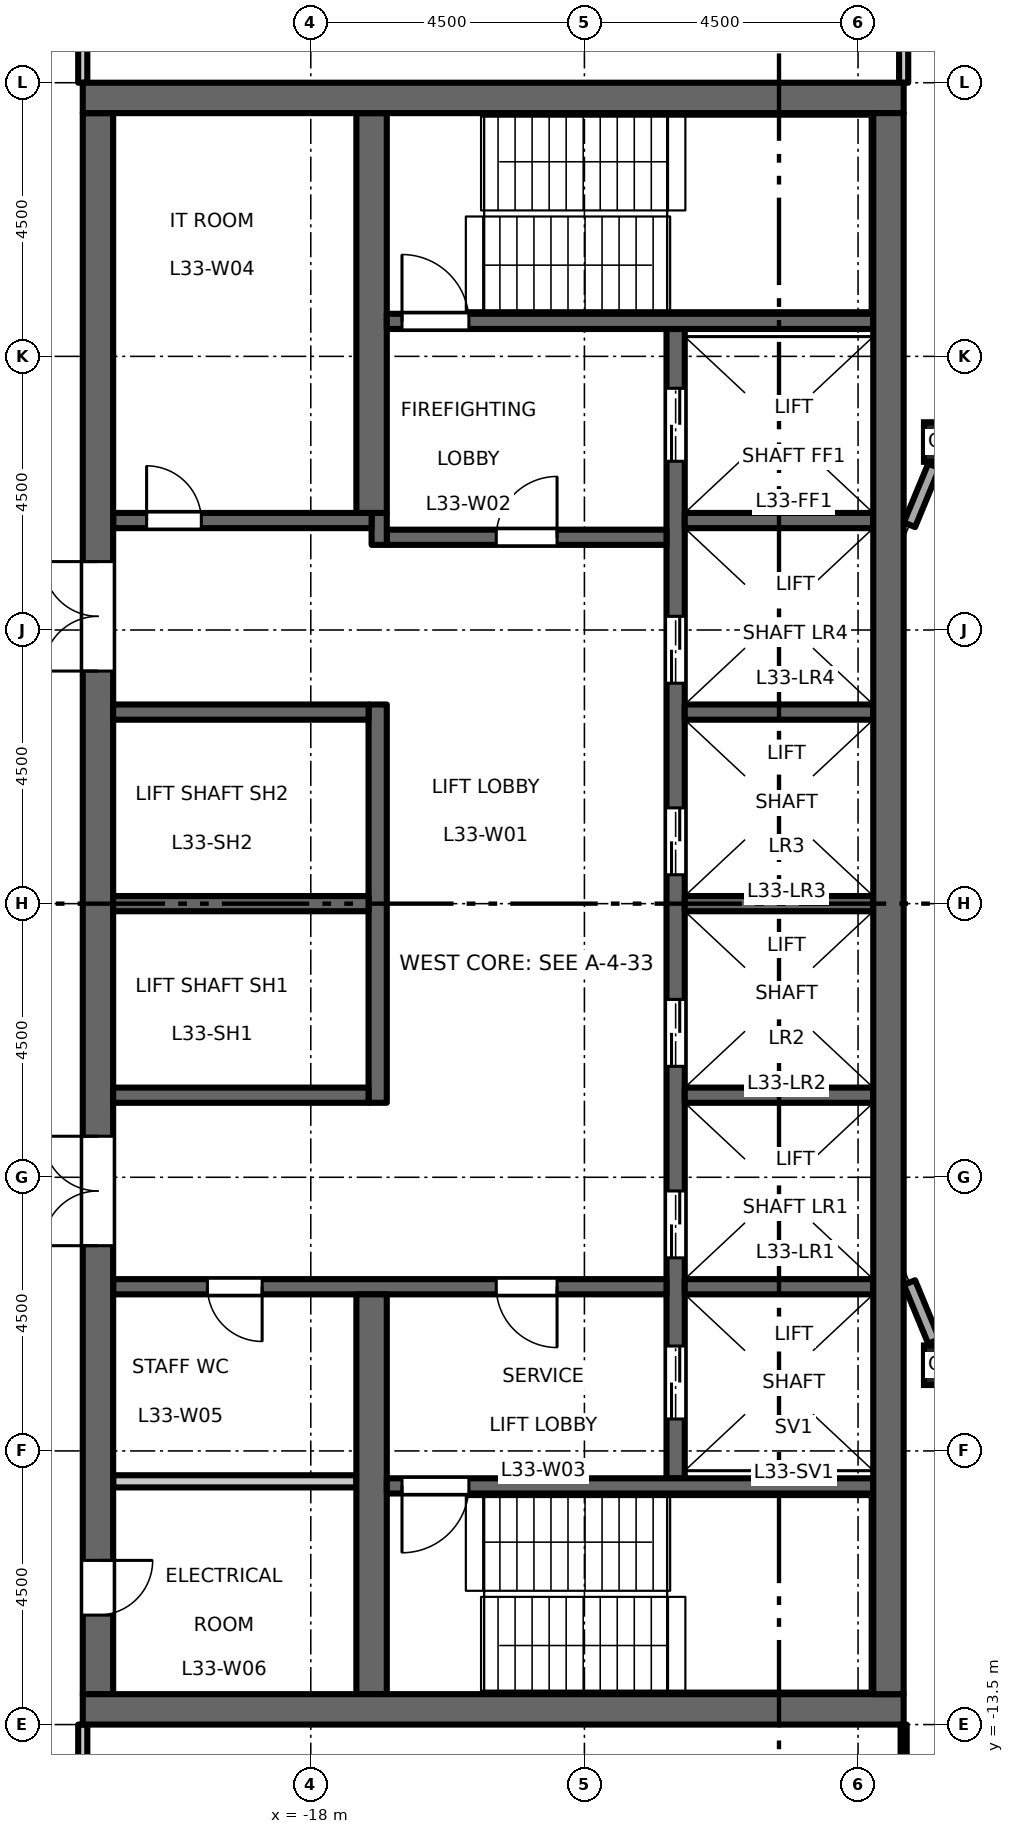
"""IFC4 building model, lengths in metres.
Left out: names, types, materials, properties, quantities, classifications, styles, units other than length and angle.
Written with IfcOpenShell. Run it as: python <this file> out.ifc"""

import sys

from ifc_helpers import new_model, si_unit, direction, frame, frame_2d, origin, origin_2d, place, context, subcontext, project, spatial, rectangle, hollow_rectangle, extrude, element, fill, save


model = new_model("IFC4")
c1 = context("Model", 3, precision=1e-05, world=origin(), true_north=direction((0.0, 1.0)))
c2 = subcontext(c1, "Body", "Model", "MODEL_VIEW")
j1 = project(units=[si_unit("LENGTHUNIT", "METRE"), si_unit("PLANEANGLEUNIT", "RADIAN")], contexts=[c1])
p1 = place(None, origin())
s1 = spatial("IfcSite", under=j1, at=p1, CompositionType="ELEMENT")
p2 = place(p1, origin())
s2 = spatial("IfcBuilding", under=s1, at=p2, CompositionType="ELEMENT")
p3 = place(p2, frame((0.0, 0.0, 154.2)))
s3 = spatial("IfcBuildingStorey", under=s2, at=p3, CompositionType="ELEMENT", Elevation=154.2)
for number, where, z_axis, x_axis in (
    (1, (-7.591, -7.591, 0.0), (0.0, 0.0, 1.0), (1.0, 0.0, 0.0)),
    (2, (-7.591, 7.591, 0.0), (0.0, 0.0, 1.0), (1.0, 0.0, 0.0)),
):
    element("IfcColumn", number, at=place(p3, frame(where, z_axis=z_axis, x_axis=x_axis)), inside=s3, PredefinedType="COLUMN", context=c2, shape_type="SweptSolid", body=[
        extrude(hollow_rectangle(XDim=0.65, YDim=0.65, WallThickness=0.036, at=origin_2d()), origin(), (0.0, 0.0, 1.0), 4.5),
    ])
p4 = place(p3, frame((-12.0, -9.45, 0.0), z_axis=(0.0, 0.0, 1.0), x_axis=(0.0, 1.0, 0.0)))
e3 = element("IfcWall", 3, at=p4, inside=s3, PredefinedType="SHEAR", context=c2, shape_type="SweptSolid", body=[
    extrude(rectangle(XDim=18.9, YDim=0.3, at=frame_2d((9.45, 0.0))), origin(), (0.0, 0.0, 1.0), 4.35),
])
p5 = place(p4, frame((3.625, 0.0, 0.0)))
e4 = element("IfcOpeningElement", 4, at=p5, cuts=e3, PredefinedType="OPENING", context=c2, shape_type="SweptSolid", body=[
    extrude(rectangle(XDim=1.1, YDim=2.1, at=frame_2d((0.55, 1.05))), frame((0.0, 0.16, 0.0), z_axis=(0.0, -1.0, 0.0), x_axis=(1.0, 0.0, 0.0)), (0.0, 0.0, 1.0), 0.32),
])
p6 = place(p4, frame((6.775, 0.0, 0.0)))
e5 = element("IfcOpeningElement", 5, at=p6, cuts=e3, PredefinedType="OPENING", context=c2, shape_type="SweptSolid", body=[
    extrude(rectangle(XDim=1.1, YDim=2.1, at=frame_2d((0.55, 1.05))), frame((0.0, 0.16, 0.0), z_axis=(0.0, -1.0, 0.0), x_axis=(1.0, 0.0, 0.0)), (0.0, 0.0, 1.0), 0.32),
])
p7 = place(p4, frame((9.925, 0.0, 0.0)))
e6 = element("IfcOpeningElement", 6, at=p7, cuts=e3, PredefinedType="OPENING", context=c2, shape_type="SweptSolid", body=[
    extrude(rectangle(XDim=1.1, YDim=2.1, at=frame_2d((0.55, 1.05))), frame((0.0, 0.16, 0.0), z_axis=(0.0, -1.0, 0.0), x_axis=(1.0, 0.0, 0.0)), (0.0, 0.0, 1.0), 0.32),
])
p8 = place(p4, frame((13.075, 0.0, 0.0)))
e7 = element("IfcOpeningElement", 7, at=p8, cuts=e3, PredefinedType="OPENING", context=c2, shape_type="SweptSolid", body=[
    extrude(rectangle(XDim=1.1, YDim=2.1, at=frame_2d((0.55, 1.05))), frame((0.0, 0.16, 0.0), z_axis=(0.0, -1.0, 0.0), x_axis=(1.0, 0.0, 0.0)), (0.0, 0.0, 1.0), 0.32),
])
p9 = place(p4, frame((16.725, 0.0, 0.0)))
e8 = element("IfcOpeningElement", 8, at=p9, cuts=e3, PredefinedType="OPENING", context=c2, shape_type="SweptSolid", body=[
    extrude(rectangle(XDim=1.2, YDim=2.1, at=frame_2d((0.6, 1.05))), frame((0.0, 0.16, 0.0), z_axis=(0.0, -1.0, 0.0), x_axis=(1.0, 0.0, 0.0)), (0.0, 0.0, 1.0), 0.32),
])
p10 = place(p4, frame((0.975, 0.0, 0.0)))
e9 = element("IfcOpeningElement", 9, at=p10, cuts=e3, PredefinedType="OPENING", context=c2, shape_type="SweptSolid", body=[
    extrude(rectangle(XDim=1.2, YDim=2.1, at=frame_2d((0.6, 1.05))), frame((0.0, 0.16, 0.0), z_axis=(0.0, -1.0, 0.0), x_axis=(1.0, 0.0, 0.0)), (0.0, 0.0, 1.0), 0.32),
])
p11 = place(p3, frame((-12.15, 6.025, 0.0), z_axis=(0.0, 0.0, 1.0), x_axis=(-1.0, 0.0, 0.0)))
e10 = element("IfcWall", 10, at=p11, inside=s3, PredefinedType="SHEAR", context=c2, shape_type="SweptSolid", body=[
    extrude(rectangle(XDim=4.6, YDim=0.25, at=frame_2d((2.3, 0.0))), origin(), (0.0, 0.0, 1.0), 4.35),
])
p12 = place(p11, frame((1.8, 0.0, 0.0)))
e11 = element("IfcOpeningElement", 11, at=p12, cuts=e10, PredefinedType="OPENING", context=c2, shape_type="SweptSolid", body=[
    extrude(rectangle(XDim=1.0, YDim=2.1, at=frame_2d((0.5, 1.05))), frame((0.0, 0.135, 0.0), z_axis=(0.0, -1.0, 0.0), x_axis=(1.0, 0.0, 0.0)), (0.0, 0.0, 1.0), 0.27),
])
p13 = place(p3, frame((-16.875, 5.9, 0.0), z_axis=(0.0, 0.0, 1.0), x_axis=(0.0, 1.0, 0.0)))
e12 = element("IfcWall", 12, at=p13, inside=s3, PredefinedType="SHEAR", context=c2, shape_type="SweptSolid", body=[
    extrude(rectangle(XDim=0.525, YDim=0.25, at=frame_2d((0.263, 0.0))), origin(), (0.0, 0.0, 1.0), 4.35),
])
p14 = place(p3, frame((-17.0, 6.3, 0.0), z_axis=(0.0, 0.0, 1.0), x_axis=(-1.0, 0.0, 0.0)))
e13 = element("IfcWall", 13, at=p14, inside=s3, PredefinedType="SHEAR", context=c2, shape_type="SweptSolid", body=[
    extrude(rectangle(XDim=4.25, YDim=0.25, at=frame_2d((2.125, 0.0))), origin(), (0.0, 0.0, 1.0), 4.35),
])
p15 = place(p14, frame((2.8, 0.0, 0.0)))
e14 = element("IfcOpeningElement", 14, at=p15, cuts=e13, PredefinedType="OPENING", context=c2, shape_type="SweptSolid", body=[
    extrude(rectangle(XDim=0.9, YDim=2.1, at=frame_2d((0.45, 1.05))), frame((0.0, 0.135, 0.0), z_axis=(0.0, -1.0, 0.0), x_axis=(1.0, 0.0, 0.0)), (0.0, 0.0, 1.0), 0.27),
])
p16 = place(p3, frame((-12.15, -6.3, 0.0), z_axis=(0.0, 0.0, 1.0), x_axis=(-1.0, 0.0, 0.0)))
e15 = element("IfcWall", 15, at=p16, inside=s3, PredefinedType="SHEAR", context=c2, shape_type="SweptSolid", body=[
    extrude(rectangle(XDim=9.1, YDim=0.25, at=frame_2d((4.55, 0.0))), origin(), (0.0, 0.0, 1.0), 4.35),
])
p17 = place(p16, frame((1.8, 0.0, 0.0)))
e16 = element("IfcOpeningElement", 16, at=p17, cuts=e15, PredefinedType="OPENING", context=c2, shape_type="SweptSolid", body=[
    extrude(rectangle(XDim=1.0, YDim=2.1, at=frame_2d((0.5, 1.05))), frame((0.0, 0.135, 0.0), z_axis=(0.0, -1.0, 0.0), x_axis=(1.0, 0.0, 0.0)), (0.0, 0.0, 1.0), 0.27),
])
p18 = place(p16, frame((6.65, 0.0, 0.0)))
e17 = element("IfcOpeningElement", 17, at=p18, cuts=e15, PredefinedType="OPENING", context=c2, shape_type="SweptSolid", body=[
    extrude(rectangle(XDim=0.9, YDim=2.1, at=frame_2d((0.45, 1.05))), frame((0.0, 0.135, 0.0), z_axis=(0.0, -1.0, 0.0), x_axis=(1.0, 0.0, 0.0)), (0.0, 0.0, 1.0), 0.27),
])
p19 = place(p3, frame((-21.5, -13.0, 0.0), z_axis=(0.0, 0.0, 1.0), x_axis=(0.0, 1.0, 0.0)))
e18 = element("IfcWall", 18, at=p19, inside=s3, PredefinedType="SHEAR", context=c2, shape_type="SweptSolid", body=[
    extrude(rectangle(XDim=26.0, YDim=0.5, at=frame_2d((13.0, 0.0))), origin(), (0.0, 0.0, 1.0), 4.35),
])
p20 = place(p19, frame((16.825, 0.0, 0.0)))
e19 = element("IfcOpeningElement", 19, at=p20, cuts=e18, PredefinedType="OPENING", context=c2, shape_type="SweptSolid", body=[
    extrude(rectangle(XDim=1.8, YDim=2.1, at=frame_2d((0.9, 1.05))), frame((0.0, 0.26, 0.0), z_axis=(0.0, -1.0, 0.0), x_axis=(1.0, 0.0, 0.0)), (0.0, 0.0, 1.0), 0.52),
])
p21 = place(p19, frame((7.375, 0.0, 0.0)))
e20 = element("IfcOpeningElement", 20, at=p21, cuts=e18, PredefinedType="OPENING", context=c2, shape_type="SweptSolid", body=[
    extrude(rectangle(XDim=1.8, YDim=2.1, at=frame_2d((0.9, 1.05))), frame((0.0, 0.26, 0.0), z_axis=(0.0, -1.0, 0.0), x_axis=(1.0, 0.0, 0.0)), (0.0, 0.0, 1.0), 0.52),
])
p22 = place(p19, frame((1.3, 0.0, 0.0)))
e21 = element("IfcOpeningElement", 21, at=p22, cuts=e18, PredefinedType="OPENING", context=c2, shape_type="SweptSolid", body=[
    extrude(rectangle(XDim=0.9, YDim=2.1, at=frame_2d((0.45, 1.05))), frame((0.0, 0.26, 0.0), z_axis=(0.0, -1.0, 0.0), x_axis=(1.0, 0.0, 0.0)), (0.0, 0.0, 1.0), 0.52),
])
p23 = place(p3, frame((-17.25, -9.5, 0.0), z_axis=(0.0, 0.0, 1.0), x_axis=(-1.0, 0.0, 0.0)))
e22 = element("IfcWall", 22, at=p23, inside=s3, PredefinedType="PARTITIONING", context=c2, shape_type="SweptSolid", body=[
    extrude(rectangle(XDim=4.0, YDim=0.2, at=frame_2d((2.0, 0.0))), origin(), (0.0, 0.0, 1.0), 4.35),
])
p24 = place(p3, frame((-16.9, -3.275, 0.0), z_axis=(0.0, 0.0, 1.0), x_axis=(0.0, 1.0, 0.0)))
e23 = element("IfcWall", 23, at=p24, inside=s3, PredefinedType="SHEAR", context=c2, shape_type="SweptSolid", body=[
    extrude(rectangle(XDim=6.55, YDim=0.3, at=frame_2d((3.275, 0.0))), origin(), (0.0, 0.0, 1.0), 4.35),
])
for number, where, z_axis, x_axis in (
    (24, (-17.05, 0.0, 0.0), (0.0, 0.0, 1.0), (-1.0, 0.0, 0.0)),
    (25, (-17.05, 3.15, 0.0), (0.0, 0.0, 1.0), (-1.0, 0.0, 0.0)),
    (26, (-17.05, -3.15, 0.0), (0.0, 0.0, 1.0), (-1.0, 0.0, 0.0)),
):
    element("IfcWall", number, at=place(p3, frame(where, z_axis=z_axis, x_axis=x_axis)), inside=s3, PredefinedType="SHEAR", context=c2, shape_type="SweptSolid", body=[
        extrude(rectangle(XDim=4.2, YDim=0.25, at=frame_2d((2.1, 0.0))), origin(), (0.0, 0.0, 1.0), 4.35),
    ])
for number, where, z_axis, x_axis in (
    (27, (-17.0, 6.425, 0.0), (0.0, 0.0, 1.0), (0.0, 1.0, 0.0)),
    (28, (-17.0, -13.0, 0.0), (0.0, 0.0, 1.0), (0.0, 1.0, 0.0)),
):
    element("IfcWall", number, at=place(p3, frame(where, z_axis=z_axis, x_axis=x_axis)), inside=s3, PredefinedType="SHEAR", context=c2, shape_type="SweptSolid", body=[
        extrude(rectangle(XDim=6.575, YDim=0.5, at=frame_2d((3.288, 0.0))), origin(), (0.0, 0.0, 1.0), 4.35),
    ])
for number, where, z_axis, x_axis in (
    (29, (-8.75, 0.0, 0.0), (0.0, 0.0, 1.0), (-1.0, 0.0, 0.0)),
    (30, (-8.75, 3.15, 0.0), (0.0, 0.0, 1.0), (-1.0, 0.0, 0.0)),
    (31, (-8.75, 6.3, 0.0), (0.0, 0.0, 1.0), (-1.0, 0.0, 0.0)),
    (32, (-8.75, -3.15, 0.0), (0.0, 0.0, 1.0), (-1.0, 0.0, 0.0)),
    (33, (-8.75, -6.3, 0.0), (0.0, 0.0, 1.0), (-1.0, 0.0, 0.0)),
):
    element("IfcWall", number, at=place(p3, frame(where, z_axis=z_axis, x_axis=x_axis)), inside=s3, PredefinedType="SHEAR", context=c2, shape_type="SweptSolid", body=[
        extrude(rectangle(XDim=3.1, YDim=0.25, at=frame_2d((1.55, 0.0))), origin(), (0.0, 0.0, 1.0), 4.35),
    ])
p25 = place(p3, frame((-8.75, 9.575, 0.0), z_axis=(0.0, 0.0, 1.0), x_axis=(-1.0, 0.0, 0.0)))
e34 = element("IfcWall", 34, at=p25, inside=s3, PredefinedType="SHEAR", context=c2, shape_type="SweptSolid", body=[
    extrude(rectangle(XDim=8.0, YDim=0.25, at=frame_2d((4.0, 0.0))), origin(), (0.0, 0.0, 1.0), 4.35),
])
p26 = place(p25, frame((6.65, 0.0, 0.0)))
e35 = element("IfcOpeningElement", 35, at=p26, cuts=e34, PredefinedType="OPENING", context=c2, shape_type="SweptSolid", body=[
    extrude(rectangle(XDim=1.1, YDim=2.1, at=frame_2d((0.55, 1.05))), frame((0.0, 0.135, 0.0), z_axis=(0.0, -1.0, 0.0), x_axis=(1.0, 0.0, 0.0)), (0.0, 0.0, 1.0), 0.27),
])
p27 = place(p3, frame((-8.75, -9.575, 0.0), z_axis=(0.0, 0.0, 1.0), x_axis=(-1.0, 0.0, 0.0)))
e36 = element("IfcWall", 36, at=p27, inside=s3, PredefinedType="SHEAR", context=c2, shape_type="SweptSolid", body=[
    extrude(rectangle(XDim=8.0, YDim=0.25, at=frame_2d((4.0, 0.0))), origin(), (0.0, 0.0, 1.0), 4.35),
])
p28 = place(p27, frame((6.65, 0.0, 0.0)))
e37 = element("IfcOpeningElement", 37, at=p28, cuts=e36, PredefinedType="OPENING", context=c2, shape_type="SweptSolid", body=[
    extrude(rectangle(XDim=1.1, YDim=2.1, at=frame_2d((0.55, 1.05))), frame((0.0, 0.135, 0.0), z_axis=(0.0, -1.0, 0.0), x_axis=(1.0, 0.0, 0.0)), (0.0, 0.0, 1.0), 0.27),
])
for number, where, z_axis, x_axis in (
    (38, (-8.25, 13.25, 0.0), (0.0, 0.0, 1.0), (-1.0, 0.0, 0.0)),
    (39, (-8.25, -13.25, 0.0), (0.0, 0.0, 1.0), (-1.0, 0.0, 0.0)),
):
    element("IfcWall", number, at=place(p3, frame(where, z_axis=z_axis, x_axis=x_axis)), inside=s3, PredefinedType="SHEAR", context=c2, shape_type="SweptSolid", body=[
        extrude(rectangle(XDim=13.5, YDim=0.5, at=frame_2d((6.75, 0.0))), origin(), (0.0, 0.0, 1.0), 4.35),
    ])
p29 = place(p3, frame((-8.5, -13.0, 0.0), z_axis=(0.0, 0.0, 1.0), x_axis=(0.0, 1.0, 0.0)))
e40 = element("IfcWall", 40, at=p29, inside=s3, PredefinedType="SHEAR", context=c2, shape_type="SweptSolid", body=[
    extrude(rectangle(XDim=26.0, YDim=0.5, at=frame_2d((13.0, 0.0))), origin(), (0.0, 0.0, 1.0), 4.35),
])
for number, where, z_axis, x_axis in (
    (41, (-7.753, 7.199, 0.0), (0.0, 0.0, 1.0), (-0.383, -0.924, 0.0)),
    (42, (-8.154, -6.231, 0.0), (0.0, 0.0, 1.0), (0.383, -0.924, 0.0)),
):
    element("IfcWall", number, at=place(p3, frame(where, z_axis=z_axis, x_axis=x_axis)), inside=s3, PredefinedType="STANDARD", context=c2, shape_type="SweptSolid", body=[
        extrude(rectangle(XDim=1.048, YDim=0.2, at=frame_2d((0.524, 0.0))), origin(), (0.0, 0.0, 1.0), 3.826),
    ])
for number, where, z_axis, x_axis in (
    (43, (-21.75, -16.925, 0.0), (0.0, 0.0, 1.0), (0.0, 1.0, 0.0)),
    (44, (-21.75, 13.5, 0.0), (0.0, 0.0, 1.0), (0.0, 1.0, 0.0)),
):
    element("IfcWall", number, at=place(p3, frame(where, z_axis=z_axis, x_axis=x_axis)), inside=s3, PredefinedType="PARTITIONING", context=c2, shape_type="SweptSolid", body=[
        extrude(rectangle(XDim=3.425, YDim=0.15, at=frame_2d((1.712, 0.0))), origin(), (0.0, 0.0, 1.0), 4.35),
    ])
p30 = place(p3, frame((-8.25, -16.925, 0.0), z_axis=(0.0, 0.0, 1.0), x_axis=(0.0, 1.0, 0.0)))
e45 = element("IfcWall", 45, at=p30, inside=s3, PredefinedType="PARTITIONING", context=c2, shape_type="SweptSolid", body=[
    extrude(rectangle(XDim=3.425, YDim=0.1, at=frame_2d((1.712, 0.0))), origin(), (0.0, 0.0, 1.0), 4.35),
])
p31 = place(p3, frame((-8.25, 13.5, 0.0), z_axis=(0.0, 0.0, 1.0), x_axis=(0.0, 1.0, 0.0)))
e46 = element("IfcWall", 46, at=p31, inside=s3, PredefinedType="PARTITIONING", context=c2, shape_type="SweptSolid", body=[
    extrude(rectangle(XDim=3.425, YDim=0.15, at=frame_2d((1.712, 0.0))), origin(), (0.0, 0.0, 1.0), 4.35),
])
p32 = place(p12, origin())
e47 = element("IfcDoor", 47, at=p32, inside=s3, OperationType="SINGLE_SWING_LEFT", PredefinedType="DOOR", context=c2, shape_type="SweptSolid", body=[
    extrude(rectangle(XDim=1.0, YDim=2.1, at=frame_2d((0.5, 1.05))), frame((0.0, 0.025, 0.0), z_axis=(0.0, -1.0, 0.0), x_axis=(1.0, 0.0, 0.0)), (0.0, 0.0, 1.0), 0.05),
])
fill(e11, e47)
p33 = place(p17, origin())
e48 = element("IfcDoor", 48, at=p33, inside=s3, OperationType="SINGLE_SWING_RIGHT", PredefinedType="DOOR", context=c2, shape_type="SweptSolid", body=[
    extrude(rectangle(XDim=1.0, YDim=2.1, at=frame_2d((0.5, 1.05))), frame((0.0, 0.025, 0.0), z_axis=(0.0, -1.0, 0.0), x_axis=(1.0, 0.0, 0.0)), (0.0, 0.0, 1.0), 0.05),
])
fill(e16, e48)
p34 = place(p26, origin())
e49 = element("IfcDoor", 49, at=p34, inside=s3, OperationType="SINGLE_SWING_RIGHT", PredefinedType="DOOR", context=c2, shape_type="SweptSolid", body=[
    extrude(rectangle(XDim=1.1, YDim=2.1, at=frame_2d((0.55, 1.05))), frame((0.0, 0.025, 0.0), z_axis=(0.0, -1.0, 0.0), x_axis=(1.0, 0.0, 0.0)), (0.0, 0.0, 1.0), 0.05),
])
fill(e35, e49)
p35 = place(p28, origin())
e50 = element("IfcDoor", 50, at=p35, inside=s3, OperationType="SINGLE_SWING_LEFT", PredefinedType="DOOR", context=c2, shape_type="SweptSolid", body=[
    extrude(rectangle(XDim=1.1, YDim=2.1, at=frame_2d((0.55, 1.05))), frame((0.0, 0.025, 0.0), z_axis=(0.0, -1.0, 0.0), x_axis=(1.0, 0.0, 0.0)), (0.0, 0.0, 1.0), 0.05),
])
fill(e37, e50)
p36 = place(p20, origin())
e51 = element("IfcDoor", 51, at=p36, inside=s3, OperationType="DOUBLE_DOOR_DOUBLE_SWING", PredefinedType="DOOR", context=c2, shape_type="SweptSolid", body=[
    extrude(rectangle(XDim=1.8, YDim=2.1, at=frame_2d((0.9, 1.05))), frame((0.0, 0.025, 0.0), z_axis=(0.0, -1.0, 0.0), x_axis=(1.0, 0.0, 0.0)), (0.0, 0.0, 1.0), 0.05),
])
fill(e19, e51)
p37 = place(p21, origin())
e52 = element("IfcDoor", 52, at=p37, inside=s3, OperationType="DOUBLE_DOOR_DOUBLE_SWING", PredefinedType="DOOR", context=c2, shape_type="SweptSolid", body=[
    extrude(rectangle(XDim=1.8, YDim=2.1, at=frame_2d((0.9, 1.05))), frame((0.0, 0.025, 0.0), z_axis=(0.0, -1.0, 0.0), x_axis=(1.0, 0.0, 0.0)), (0.0, 0.0, 1.0), 0.05),
])
fill(e20, e52)
p38 = place(p5, origin())
e53 = element("IfcDoor", 53, at=p38, inside=s3, OperationType="DOUBLE_DOOR_SLIDING", PredefinedType="DOOR", context=c2, shape_type="SweptSolid", body=[
    extrude(rectangle(XDim=1.1, YDim=2.1, at=frame_2d((0.55, 1.05))), frame((0.0, 0.025, 0.0), z_axis=(0.0, -1.0, 0.0), x_axis=(1.0, 0.0, 0.0)), (0.0, 0.0, 1.0), 0.05),
])
fill(e4, e53)
p39 = place(p6, origin())
e54 = element("IfcDoor", 54, at=p39, inside=s3, OperationType="DOUBLE_DOOR_SLIDING", PredefinedType="DOOR", context=c2, shape_type="SweptSolid", body=[
    extrude(rectangle(XDim=1.1, YDim=2.1, at=frame_2d((0.55, 1.05))), frame((0.0, 0.025, 0.0), z_axis=(0.0, -1.0, 0.0), x_axis=(1.0, 0.0, 0.0)), (0.0, 0.0, 1.0), 0.05),
])
fill(e5, e54)
p40 = place(p7, origin())
e55 = element("IfcDoor", 55, at=p40, inside=s3, OperationType="DOUBLE_DOOR_SLIDING", PredefinedType="DOOR", context=c2, shape_type="SweptSolid", body=[
    extrude(rectangle(XDim=1.1, YDim=2.1, at=frame_2d((0.55, 1.05))), frame((0.0, 0.025, 0.0), z_axis=(0.0, -1.0, 0.0), x_axis=(1.0, 0.0, 0.0)), (0.0, 0.0, 1.0), 0.05),
])
fill(e6, e55)
p41 = place(p8, origin())
e56 = element("IfcDoor", 56, at=p41, inside=s3, OperationType="DOUBLE_DOOR_SLIDING", PredefinedType="DOOR", context=c2, shape_type="SweptSolid", body=[
    extrude(rectangle(XDim=1.1, YDim=2.1, at=frame_2d((0.55, 1.05))), frame((0.0, 0.025, 0.0), z_axis=(0.0, -1.0, 0.0), x_axis=(1.0, 0.0, 0.0)), (0.0, 0.0, 1.0), 0.05),
])
fill(e7, e56)
p42 = place(p9, origin())
e57 = element("IfcDoor", 57, at=p42, inside=s3, OperationType="DOUBLE_DOOR_SLIDING", PredefinedType="DOOR", context=c2, shape_type="SweptSolid", body=[
    extrude(rectangle(XDim=1.2, YDim=2.1, at=frame_2d((0.6, 1.05))), frame((0.0, 0.025, 0.0), z_axis=(0.0, -1.0, 0.0), x_axis=(1.0, 0.0, 0.0)), (0.0, 0.0, 1.0), 0.05),
])
fill(e8, e57)
p43 = place(p10, origin())
e58 = element("IfcDoor", 58, at=p43, inside=s3, OperationType="DOUBLE_DOOR_SLIDING", PredefinedType="DOOR", context=c2, shape_type="SweptSolid", body=[
    extrude(rectangle(XDim=1.2, YDim=2.1, at=frame_2d((0.6, 1.05))), frame((0.0, 0.025, 0.0), z_axis=(0.0, -1.0, 0.0), x_axis=(1.0, 0.0, 0.0)), (0.0, 0.0, 1.0), 0.05),
])
fill(e9, e58)
p44 = place(p15, origin())
e59 = element("IfcDoor", 59, at=p44, inside=s3, OperationType="SINGLE_SWING_RIGHT", PredefinedType="DOOR", context=c2, shape_type="SweptSolid", body=[
    extrude(rectangle(XDim=0.9, YDim=2.1, at=frame_2d((0.45, 1.05))), frame((0.0, 0.025, 0.0), z_axis=(0.0, -1.0, 0.0), x_axis=(1.0, 0.0, 0.0)), (0.0, 0.0, 1.0), 0.05),
])
fill(e14, e59)
p45 = place(p18, origin())
e60 = element("IfcDoor", 60, at=p45, inside=s3, OperationType="SINGLE_SWING_RIGHT", PredefinedType="DOOR", context=c2, shape_type="SweptSolid", body=[
    extrude(rectangle(XDim=0.9, YDim=2.1, at=frame_2d((0.45, 1.05))), frame((0.0, 0.025, 0.0), z_axis=(0.0, -1.0, 0.0), x_axis=(1.0, 0.0, 0.0)), (0.0, 0.0, 1.0), 0.05),
])
fill(e17, e60)
p46 = place(p22, origin())
e61 = element("IfcDoor", 61, at=p46, inside=s3, OperationType="SINGLE_SWING_RIGHT", PredefinedType="DOOR", context=c2, shape_type="SweptSolid", body=[
    extrude(rectangle(XDim=0.9, YDim=2.1, at=frame_2d((0.45, 1.05))), frame((0.0, 0.025, 0.0), z_axis=(0.0, -1.0, 0.0), x_axis=(1.0, 0.0, 0.0)), (0.0, 0.0, 1.0), 0.05),
])
fill(e21, e61)
save(model, sys.argv[1])
